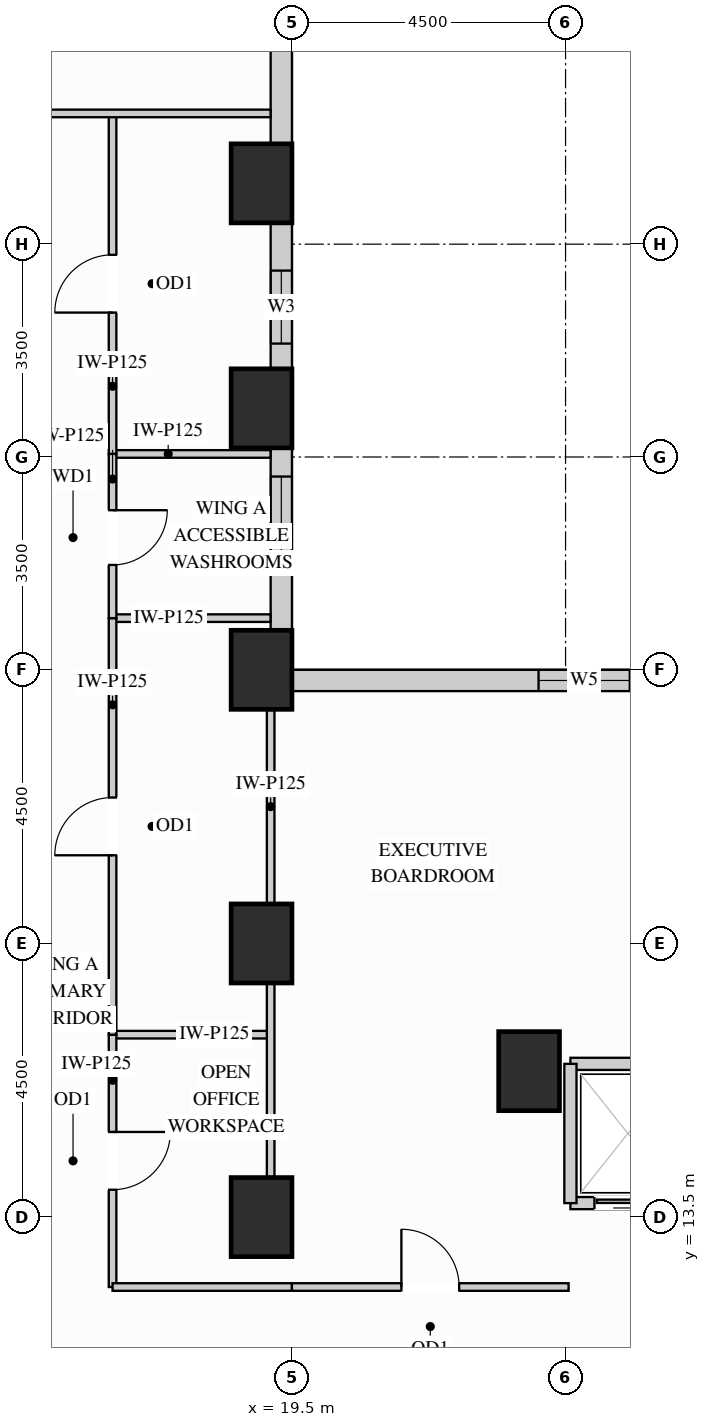
"""IFC4 building model, lengths in metres.
Left out: names, types, materials, properties, quantities, classifications, styles, units other than length and angle.
Written with IfcOpenShell. Run it as: python <this file> out.ifc"""

import sys

from ifc_helpers import new_model, si_unit, direction, frame, frame_2d, origin, origin_2d, place, context, subcontext, project, spatial, rectangle, extrude, source, transform, mapped, element, fill, save


model = new_model("IFC4")
c1 = context("Model", 3, precision=1e-05, world=origin(), true_north=direction((0.0, 1.0)))
c2 = subcontext(c1, "Body", "Model", "MODEL_VIEW")
j1 = project(units=[si_unit("LENGTHUNIT", "METRE"), si_unit("PLANEANGLEUNIT", "RADIAN")], contexts=[c1])
p1 = place(None, origin())
s1 = spatial("IfcSite", under=j1, at=p1, CompositionType="ELEMENT")
p2 = place(p1, origin())
s2 = spatial("IfcBuilding", under=s1, at=p2, CompositionType="ELEMENT")
p3 = place(p2, frame((0.0, 0.0, 44.1)))
s3 = spatial("IfcBuildingStorey", under=s2, at=p3, CompositionType="ELEMENT", Elevation=44.1)
m1 = source(origin(), c2, "Body", "SweptSolid", [
    extrude(rectangle(XDim=1.0, YDim=1.3, at=origin_2d()), origin(), (0.0, 0.0, 1.0), 3.38),
])
for number, where, z_axis, x_axis in (
    (1, (19.0, 13.5, 0.0), (0.0, 0.0, 1.0), (1.0, 0.0, 0.0)),
    (2, (19.0, 18.0, 0.0), (0.0, 0.0, 1.0), (1.0, 0.0, 0.0)),
    (3, (19.0, 22.5, 0.0), (0.0, 0.0, 1.0), (1.0, 0.0, 0.0)),
    (4, (19.0, 26.8, 0.0), (0.0, 0.0, 1.0), (1.0, 0.0, 0.0)),
    (5, (19.0, 30.5, 0.0), (0.0, 0.0, 1.0), (1.0, 0.0, 0.0)),
    (6, (23.4, 15.9, 0.0), (0.0, 0.0, 1.0), (1.0, 0.0, 0.0)),
):
    element("IfcColumn", number, at=place(p3, frame(where, z_axis=z_axis, x_axis=x_axis)), inside=s3, PredefinedType="COLUMN", context=c2, shape_type="MappedRepresentation", body=[
        mapped(m1, transform((0.0, 0.0, 0.0), x_axis=(1.0, 0.0, 0.0), y_axis=(0.0, 1.0, 0.0), z_axis=(0.0, 0.0, 1.0))),
    ])
p4 = place(p3, frame((34.352, 22.325, 0.0), z_axis=(0.0, 0.0, 1.0), x_axis=(-1.0, 0.0, 0.0)))
e7 = element("IfcWall", 7, at=p4, inside=s3, PredefinedType="SOLIDWALL", context=c2, shape_type="SweptSolid", body=[
    extrude(rectangle(XDim=14.854, YDim=0.35, at=frame_2d((7.427, 0.0))), origin(), (0.0, 0.0, 1.0), 3.365),
])
p5 = place(p4, frame((4.058, 0.0, 0.78)))
e8 = element("IfcOpeningElement", 8, at=p5, cuts=e7, PredefinedType="OPENING", context=c2, shape_type="SweptSolid", body=[
    extrude(rectangle(XDim=1.5, YDim=2.0, at=frame_2d((0.75, 1.0))), frame((0.0, 0.185, 0.0), z_axis=(0.0, -1.0, 0.0), x_axis=(1.0, 0.0, 0.0)), (0.0, 0.0, 1.0), 0.37),
])
p6 = place(p4, frame((9.296, 0.0, 0.78)))
e9 = element("IfcOpeningElement", 9, at=p6, cuts=e7, PredefinedType="OPENING", context=c2, shape_type="SweptSolid", body=[
    extrude(rectangle(XDim=1.5, YDim=2.0, at=frame_2d((0.75, 1.0))), frame((0.0, 0.185, 0.0), z_axis=(0.0, -1.0, 0.0), x_axis=(1.0, 0.0, 0.0)), (0.0, 0.0, 1.0), 0.37),
])
p7 = place(p3, frame((19.325, 23.148, 0.0), z_axis=(0.0, 0.0, 1.0), x_axis=(0.0, 1.0, 0.0)))
e10 = element("IfcWall", 10, at=p7, inside=s3, PredefinedType="SOLIDWALL", context=c2, shape_type="SweptSolid", body=[
    extrude(rectangle(XDim=3.004, YDim=0.35, at=frame_2d((1.502, 0.0))), origin(), (0.0, 0.0, 1.0), 2.51),
])
p8 = place(p7, frame((1.031, 0.0, 0.78)))
e11 = element("IfcOpeningElement", 11, at=p8, cuts=e10, PredefinedType="OPENING", context=c2, shape_type="SweptSolid", body=[
    extrude(rectangle(XDim=1.5, YDim=1.55, at=frame_2d((0.75, 0.775))), frame((0.0, 0.185, 0.0), z_axis=(0.0, -1.0, 0.0), x_axis=(1.0, 0.0, 0.0)), (0.0, 0.0, 1.0), 0.37),
])
p9 = place(p3, frame((19.325, 27.448, 0.0), z_axis=(0.0, 0.0, 1.0), x_axis=(0.0, 1.0, 0.0)))
e12 = element("IfcWall", 12, at=p9, inside=s3, PredefinedType="SOLIDWALL", context=c2, shape_type="SweptSolid", body=[
    extrude(rectangle(XDim=2.404, YDim=0.35, at=frame_2d((1.202, 0.0))), origin(), (0.0, 0.0, 1.0), 2.51),
])
p10 = place(p9, frame((0.417, 0.0, 0.78)))
e13 = element("IfcOpeningElement", 13, at=p10, cuts=e12, PredefinedType="OPENING", context=c2, shape_type="SweptSolid", body=[
    extrude(rectangle(XDim=1.2, YDim=1.55, at=frame_2d((0.6, 0.775))), frame((0.0, 0.185, 0.0), z_axis=(0.0, -1.0, 0.0), x_axis=(1.0, 0.0, 0.0)), (0.0, 0.0, 1.0), 0.37),
])
m2 = source(origin(), c2, "Body", "SweptSolid", [
    extrude(rectangle(XDim=3.204, YDim=0.35, at=frame_2d((1.602, 0.0))), origin(), (0.0, 0.0, 1.0), 2.51),
])
p11 = place(p3, frame((19.325, 31.148, 0.0), z_axis=(0.0, 0.0, 1.0), x_axis=(0.0, 1.0, 0.0)))
e14 = element("IfcWall", 14, at=p11, inside=s3, PredefinedType="SOLIDWALL", context=c2, shape_type="MappedRepresentation", body=[
    mapped(m2, transform((0.0, 0.0, 0.0), x_axis=(1.0, 0.0, 0.0), y_axis=(0.0, 1.0, 0.0), z_axis=(0.0, 0.0, 1.0))),
])
m3 = source(origin(), c2, "Body", "SweptSolid", [
    extrude(rectangle(XDim=2.6, YDim=0.125, at=frame_2d((1.3, 0.0))), origin(), (0.0, 0.0, 1.0), 2.896),
])
p12 = place(p3, frame((16.55, 16.5, 0.0), z_axis=(0.0, 0.0, 1.0), x_axis=(1.0, 0.0, 0.0)))
e15 = element("IfcWall", 15, at=p12, inside=s3, PredefinedType="PARTITIONING", context=c2, shape_type="MappedRepresentation", body=[
    mapped(m3, transform((0.0, 0.0, 0.0), x_axis=(1.0, 0.0, 0.0), y_axis=(0.0, 1.0, 0.0), z_axis=(0.0, 0.0, 1.0))),
])
m4 = source(origin(), c2, "Body", "SweptSolid", [
    extrude(rectangle(XDim=2.598, YDim=0.125, at=frame_2d((1.299, 0.0))), origin(), (0.0, 0.0, 1.0), 3.365),
])
for number, where, z_axis, x_axis in (
    (16, (16.55, 23.35, 0.0), (0.0, 0.0, 1.0), (1.0, 0.0, 0.0)),
    (17, (16.55, 26.05, 0.0), (0.0, 0.0, 1.0), (1.0, 0.0, 0.0)),
):
    element("IfcWall", number, at=place(p3, frame(where, z_axis=z_axis, x_axis=x_axis)), inside=s3, PredefinedType="PARTITIONING", context=c2, shape_type="MappedRepresentation", body=[
        mapped(m4, transform((0.0, 0.0, 0.0), x_axis=(1.0, 0.0, 0.0), y_axis=(0.0, 1.0, 0.0), z_axis=(0.0, 0.0, 1.0))),
    ])
m5 = source(origin(), c2, "Body", "SweptSolid", [
    extrude(rectangle(XDim=3.18, YDim=0.125, at=frame_2d((1.59, 0.0))), origin(), (0.0, 0.0, 1.0), 2.67),
])
for number, where, z_axis, x_axis in (
    (18, (19.15, 14.16, 0.0), (0.0, 0.0, 1.0), (0.0, 1.0, 0.0)),
    (19, (19.15, 18.66, 0.0), (0.0, 0.0, 1.0), (0.0, 1.0, 0.0)),
):
    element("IfcWall", number, at=place(p3, frame(where, z_axis=z_axis, x_axis=x_axis)), inside=s3, PredefinedType="PARTITIONING", context=c2, shape_type="MappedRepresentation", body=[
        mapped(m5, transform((0.0, 0.0, 0.0), x_axis=(1.0, 0.0, 0.0), y_axis=(0.0, 1.0, 0.0), z_axis=(0.0, 0.0, 1.0))),
    ])
p13 = place(p3, frame((16.55, 12.35, 0.0), z_axis=(0.0, 0.0, 1.0), x_axis=(0.0, 1.0, 0.0)))
e20 = element("IfcWall", 20, at=p13, inside=s3, PredefinedType="PARTITIONING", context=c2, shape_type="SweptSolid", body=[
    extrude(rectangle(XDim=4.15, YDim=0.125, at=frame_2d((2.075, 0.0))), origin(), (0.0, 0.0, 1.0), 3.365),
])
p14 = place(p13, frame((1.6, 0.0, 0.0)))
e21 = element("IfcOpeningElement", 21, at=p14, cuts=e20, PredefinedType="OPENING", context=c2, shape_type="SweptSolid", body=[
    extrude(rectangle(XDim=0.95, YDim=2.15, at=frame_2d((0.475, 1.075))), frame((0.0, 0.073, 0.0), z_axis=(0.0, -1.0, 0.0), x_axis=(1.0, 0.0, 0.0)), (0.0, 0.0, 1.0), 0.145),
])
p15 = place(p3, frame((16.55, 16.5, 0.0), z_axis=(0.0, 0.0, 1.0), x_axis=(0.0, 1.0, 0.0)))
e22 = element("IfcWall", 22, at=p15, inside=s3, PredefinedType="PARTITIONING", context=c2, shape_type="SweptSolid", body=[
    extrude(rectangle(XDim=6.85, YDim=0.125, at=frame_2d((3.425, 0.0))), origin(), (0.0, 0.0, 1.0), 3.365),
])
p16 = place(p15, frame((2.95, 0.0, 0.0)))
e23 = element("IfcOpeningElement", 23, at=p16, cuts=e22, PredefinedType="OPENING", context=c2, shape_type="SweptSolid", body=[
    extrude(rectangle(XDim=0.95, YDim=2.15, at=frame_2d((0.475, 1.075))), frame((0.0, 0.073, 0.0), z_axis=(0.0, -1.0, 0.0), x_axis=(1.0, 0.0, 0.0)), (0.0, 0.0, 1.0), 0.145),
])
p17 = place(p3, frame((16.55, 26.05, 0.0), z_axis=(0.0, 0.0, 1.0), x_axis=(0.0, 1.0, 0.0)))
e24 = element("IfcWall", 24, at=p17, inside=s3, PredefinedType="PARTITIONING", context=c2, shape_type="SweptSolid", body=[
    extrude(rectangle(XDim=5.6, YDim=0.125, at=frame_2d((2.8, 0.0))), origin(), (0.0, 0.0, 1.0), 3.365),
])
p18 = place(p17, frame((2.325, 0.0, 0.0)))
e25 = element("IfcOpeningElement", 25, at=p18, cuts=e24, PredefinedType="OPENING", context=c2, shape_type="SweptSolid", body=[
    extrude(rectangle(XDim=0.95, YDim=2.15, at=frame_2d((0.475, 1.075))), frame((0.0, 0.073, 0.0), z_axis=(0.0, -1.0, 0.0), x_axis=(1.0, 0.0, 0.0)), (0.0, 0.0, 1.0), 0.145),
])
p19 = place(p3, frame((16.55, 23.35, 0.0), z_axis=(0.0, 0.0, 1.0), x_axis=(0.0, 1.0, 0.0)))
e26 = element("IfcWall", 26, at=p19, inside=s3, PredefinedType="PARTITIONING", context=c2, shape_type="SweptSolid", body=[
    extrude(rectangle(XDim=2.7, YDim=0.125, at=frame_2d((1.35, 0.0))), origin(), (0.0, 0.0, 1.0), 3.365),
])
p20 = place(p19, frame((0.875, 0.0, 0.0)))
e27 = element("IfcOpeningElement", 27, at=p20, cuts=e26, PredefinedType="OPENING", context=c2, shape_type="SweptSolid", body=[
    extrude(rectangle(XDim=0.9, YDim=2.15, at=frame_2d((0.45, 1.075))), frame((0.0, 0.073, 0.0), z_axis=(0.0, -1.0, 0.0), x_axis=(1.0, 0.0, 0.0)), (0.0, 0.0, 1.0), 0.145),
])
m6 = source(origin(), c2, "Body", "SweptSolid", [
    extrude(rectangle(XDim=12.598, YDim=0.125, at=frame_2d((6.299, 0.0))), origin(), (0.0, 0.0, 1.0), 2.828),
])
p21 = place(p3, frame((6.55, 31.65, 0.0), z_axis=(0.0, 0.0, 1.0), x_axis=(1.0, 0.0, 0.0)))
e28 = element("IfcWall", 28, at=p21, inside=s3, PredefinedType="PARTITIONING", context=c2, shape_type="MappedRepresentation", body=[
    mapped(m6, transform((0.0, 0.0, 0.0), x_axis=(1.0, 0.0, 0.0), y_axis=(0.0, 1.0, 0.0), z_axis=(0.0, 0.0, 1.0))),
])
m7 = source(origin(), c2, "Body", "SweptSolid", [
    extrude(rectangle(XDim=2.95, YDim=0.125, at=frame_2d((1.475, 0.0))), origin(), (0.0, 0.0, 1.0), 3.365),
])
p22 = place(p3, frame((16.55, 12.35, 0.0), z_axis=(0.0, 0.0, 1.0), x_axis=(1.0, 0.0, 0.0)))
e29 = element("IfcWall", 29, at=p22, inside=s3, PredefinedType="PARTITIONING", context=c2, shape_type="MappedRepresentation", body=[
    mapped(m7, transform((0.0, 0.0, 0.0), x_axis=(1.0, 0.0, 0.0), y_axis=(0.0, 1.0, 0.0), z_axis=(0.0, 0.0, 1.0))),
])
p23 = place(p3, frame((19.5, 12.35, 0.0), z_axis=(0.0, 0.0, 1.0), x_axis=(1.0, 0.0, 0.0)))
e30 = element("IfcWall", 30, at=p23, inside=s3, PredefinedType="PARTITIONING", context=c2, shape_type="SweptSolid", body=[
    extrude(rectangle(XDim=4.55, YDim=0.125, at=frame_2d((2.275, 0.0))), origin(), (0.0, 0.0, 1.0), 3.365),
])
p24 = place(p23, frame((1.8, 0.0, 0.0)))
e31 = element("IfcOpeningElement", 31, at=p24, cuts=e30, PredefinedType="OPENING", context=c2, shape_type="SweptSolid", body=[
    extrude(rectangle(XDim=0.95, YDim=2.15, at=frame_2d((0.475, 1.075))), frame((0.0, 0.073, 0.0), z_axis=(0.0, -1.0, 0.0), x_axis=(1.0, 0.0, 0.0)), (0.0, 0.0, 1.0), 0.145),
])
m8 = source(origin(), c2, "Body", "SweptSolid", [
    extrude(rectangle(XDim=1.89, YDim=0.2, at=frame_2d((0.945, 0.0))), origin(), (0.0, 0.0, 1.0), 2.67),
])
p25 = place(p3, frame((24.08, 16.02, 0.0), z_axis=(0.0, 0.0, 1.0), x_axis=(1.0, 0.0, 0.0)))
e32 = element("IfcWall", 32, at=p25, inside=s3, PredefinedType="PARTITIONING", context=c2, shape_type="MappedRepresentation", body=[
    mapped(m8, transform((0.0, 0.0, 0.0), x_axis=(1.0, 0.0, 0.0), y_axis=(0.0, 1.0, 0.0), z_axis=(0.0, 0.0, 1.0))),
])
p26 = place(p3, frame((24.08, 13.73, 0.0), z_axis=(0.0, 0.0, 1.0), x_axis=(1.0, 0.0, 0.0)))
e33 = element("IfcWall", 33, at=p26, inside=s3, PredefinedType="PARTITIONING", context=c2, shape_type="SweptSolid", body=[
    extrude(rectangle(XDim=1.89, YDim=0.2, at=frame_2d((0.945, 0.0))), origin(), (0.0, 0.0, 1.0), 2.446),
])
p27 = place(p26, frame((0.395, 0.0, 0.0)))
e34 = element("IfcOpeningElement", 34, at=p27, cuts=e33, PredefinedType="OPENING", context=c2, shape_type="SweptSolid", body=[
    extrude(rectangle(XDim=1.1, YDim=2.2, at=frame_2d((0.55, 1.1))), frame((0.0, 0.11, 0.0), z_axis=(0.0, -1.0, 0.0), x_axis=(1.0, 0.0, 0.0)), (0.0, 0.0, 1.0), 0.22),
])
m9 = source(origin(), c2, "Body", "SweptSolid", [
    extrude(rectangle(XDim=2.29, YDim=0.2, at=frame_2d((1.145, 0.0))), origin(), (0.0, 0.0, 1.0), 3.365),
])
p28 = place(p3, frame((24.08, 13.73, 0.0), z_axis=(0.0, 0.0, 1.0), x_axis=(0.0, 1.0, 0.0)))
e35 = element("IfcWall", 35, at=p28, inside=s3, PredefinedType="PARTITIONING", context=c2, shape_type="MappedRepresentation", body=[
    mapped(m9, transform((0.0, 0.0, 0.0), x_axis=(1.0, 0.0, 0.0), y_axis=(0.0, 1.0, 0.0), z_axis=(0.0, 0.0, 1.0))),
])
m10 = source(origin(), c2, "Body", "SweptSolid", [
    extrude(rectangle(XDim=1.1, YDim=2.2, at=frame_2d((0.55, 1.1))), frame((0.0, 0.025, 0.0), z_axis=(0.0, -1.0, 0.0), x_axis=(1.0, 0.0, 0.0)), (0.0, 0.0, 1.0), 0.05),
])
p29 = place(p27, origin())
e36 = element("IfcDoor", 36, at=p29, inside=s3, OperationType="SLIDING_TO_LEFT", PredefinedType="DOOR", context=c2, shape_type="MappedRepresentation", body=[
    mapped(m10, transform((0.0, 0.0, 0.0), x_axis=(1.0, 0.0, 0.0), y_axis=(0.0, 1.0, 0.0), z_axis=(0.0, 0.0, 1.0))),
])
fill(e34, e36)
m11 = source(origin(), c2, "Body", "SweptSolid", [
    extrude(rectangle(XDim=0.95, YDim=2.15, at=frame_2d((0.475, 1.075))), frame((0.0, 0.025, 0.0), z_axis=(0.0, -1.0, 0.0), x_axis=(1.0, 0.0, 0.0)), (0.0, 0.0, 1.0), 0.05),
])
p30 = place(p14, origin())
e37 = element("IfcDoor", 37, at=p30, inside=s3, OperationType="SINGLE_SWING_RIGHT", PredefinedType="DOOR", context=c2, shape_type="MappedRepresentation", body=[
    mapped(m11, transform((0.0, 0.0, 0.0), x_axis=(1.0, 0.0, 0.0), y_axis=(0.0, 1.0, 0.0), z_axis=(0.0, 0.0, 1.0))),
])
fill(e21, e37)
p31 = place(p16, origin())
e38 = element("IfcDoor", 38, at=p31, inside=s3, OperationType="SINGLE_SWING_LEFT", PredefinedType="DOOR", context=c2, shape_type="MappedRepresentation", body=[
    mapped(m11, transform((0.0, 0.0, 0.0), x_axis=(1.0, 0.0, 0.0), y_axis=(0.0, 1.0, 0.0), z_axis=(0.0, 0.0, 1.0))),
])
fill(e23, e38)
p32 = place(p18, origin())
e39 = element("IfcDoor", 39, at=p32, inside=s3, OperationType="SINGLE_SWING_LEFT", PredefinedType="DOOR", context=c2, shape_type="MappedRepresentation", body=[
    mapped(m11, transform((0.0, 0.0, 0.0), x_axis=(1.0, 0.0, 0.0), y_axis=(0.0, 1.0, 0.0), z_axis=(0.0, 0.0, 1.0))),
])
fill(e25, e39)
p33 = place(p24, origin())
e40 = element("IfcDoor", 40, at=p33, inside=s3, OperationType="SINGLE_SWING_LEFT", PredefinedType="DOOR", context=c2, shape_type="MappedRepresentation", body=[
    mapped(m11, transform((0.0, 0.0, 0.0), x_axis=(1.0, 0.0, 0.0), y_axis=(0.0, 1.0, 0.0), z_axis=(0.0, 0.0, 1.0))),
])
fill(e31, e40)
m12 = source(origin(), c2, "Body", "SweptSolid", [
    extrude(rectangle(XDim=0.9, YDim=2.15, at=frame_2d((0.45, 1.075))), frame((0.0, 0.025, 0.0), z_axis=(0.0, -1.0, 0.0), x_axis=(1.0, 0.0, 0.0)), (0.0, 0.0, 1.0), 0.05),
])
p34 = place(p20, origin())
e41 = element("IfcDoor", 41, at=p34, inside=s3, OperationType="SINGLE_SWING_RIGHT", PredefinedType="DOOR", context=c2, shape_type="MappedRepresentation", body=[
    mapped(m12, transform((0.0, 0.0, 0.0), x_axis=(1.0, 0.0, 0.0), y_axis=(0.0, 1.0, 0.0), z_axis=(0.0, 0.0, 1.0))),
])
fill(e27, e41)
m13 = source(origin(), c2, "Body", "SweptSolid", [
    extrude(rectangle(XDim=1.2, YDim=1.55, at=frame_2d((0.6, 0.775))), frame((0.0, 0.03, 0.0), z_axis=(0.0, -1.0, 0.0), x_axis=(1.0, 0.0, 0.0)), (0.0, 0.0, 1.0), 0.06),
])
p35 = place(p10, origin())
e42 = element("IfcWindow", 42, at=p35, inside=s3, PartitioningType="SINGLE_PANEL", PredefinedType="WINDOW", context=c2, shape_type="MappedRepresentation", body=[
    mapped(m13, transform((0.0, 0.0, 0.0), x_axis=(1.0, 0.0, 0.0), y_axis=(0.0, 1.0, 0.0), z_axis=(0.0, 0.0, 1.0))),
])
fill(e13, e42)
m14 = source(origin(), c2, "Body", "SweptSolid", [
    extrude(rectangle(XDim=1.5, YDim=2.0, at=frame_2d((0.75, 1.0))), frame((0.0, 0.03, 0.0), z_axis=(0.0, -1.0, 0.0), x_axis=(1.0, 0.0, 0.0)), (0.0, 0.0, 1.0), 0.06),
])
p36 = place(p6, origin())
e43 = element("IfcWindow", 43, at=p36, inside=s3, PartitioningType="SINGLE_PANEL", PredefinedType="WINDOW", context=c2, shape_type="MappedRepresentation", body=[
    mapped(m14, transform((0.0, 0.0, 0.0), x_axis=(1.0, 0.0, 0.0), y_axis=(0.0, 1.0, 0.0), z_axis=(0.0, 0.0, 1.0))),
])
fill(e9, e43)
m15 = source(origin(), c2, "Body", "SweptSolid", [
    extrude(rectangle(XDim=1.5, YDim=1.55, at=frame_2d((0.75, 0.775))), frame((0.0, 0.03, 0.0), z_axis=(0.0, -1.0, 0.0), x_axis=(1.0, 0.0, 0.0)), (0.0, 0.0, 1.0), 0.06),
])
p37 = place(p8, origin())
e44 = element("IfcWindow", 44, at=p37, inside=s3, PartitioningType="SINGLE_PANEL", PredefinedType="WINDOW", context=c2, shape_type="MappedRepresentation", body=[
    mapped(m15, transform((0.0, 0.0, 0.0), x_axis=(1.0, 0.0, 0.0), y_axis=(0.0, 1.0, 0.0), z_axis=(0.0, 0.0, 1.0))),
])
fill(e11, e44)
save(model, sys.argv[1])
